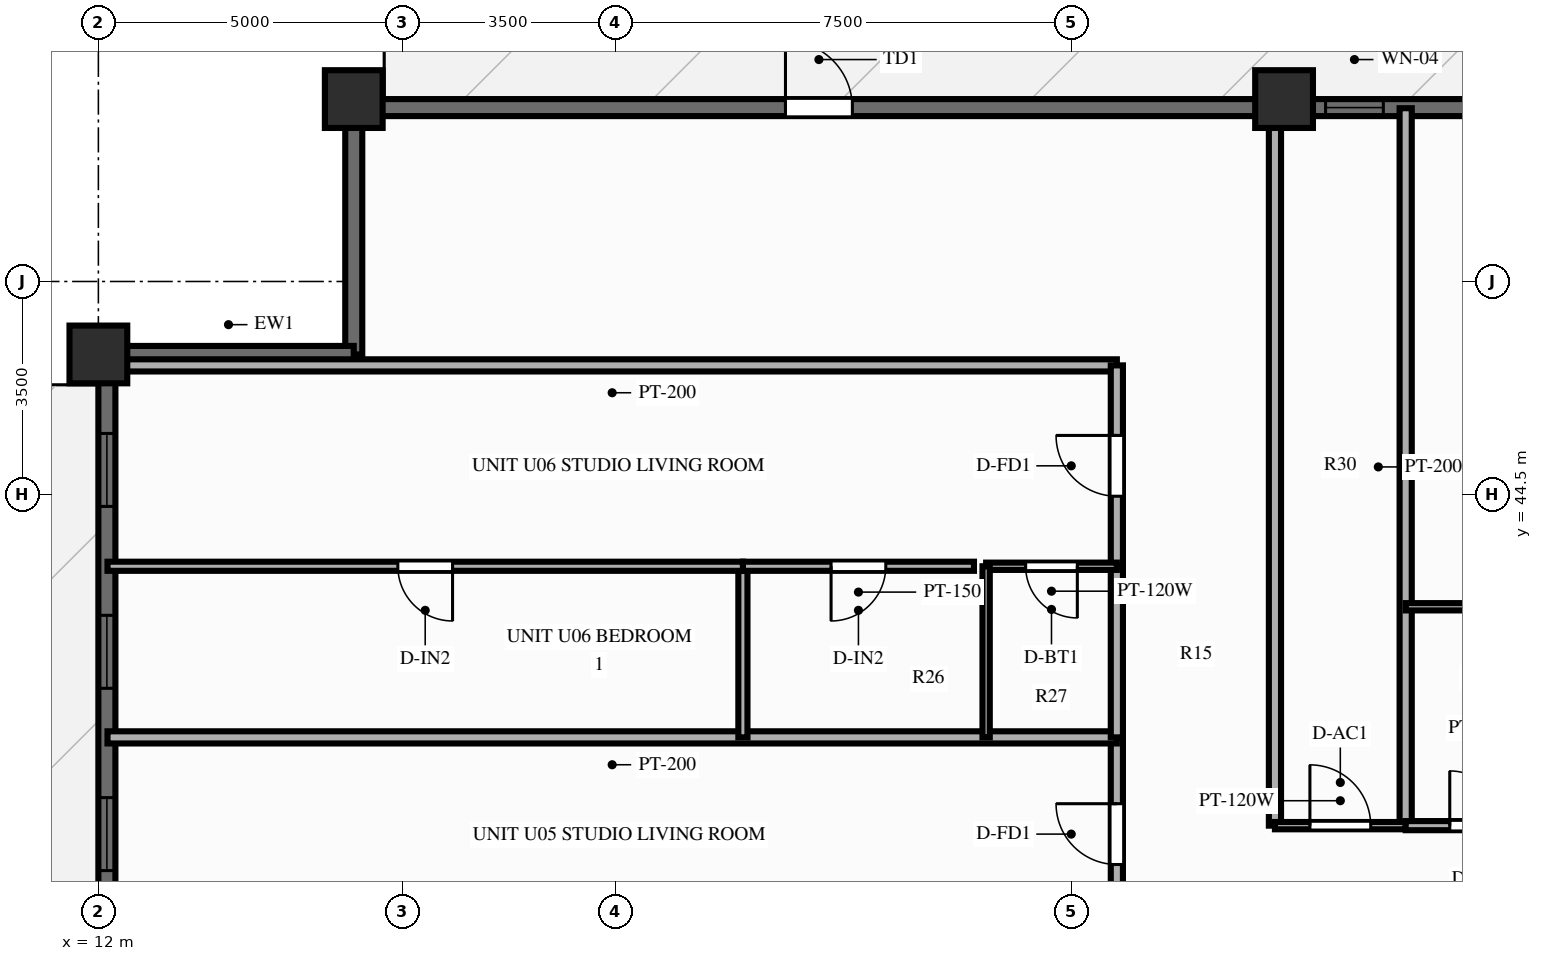
"""IFC4 building model, lengths in metres.
Left out: names, types, materials, properties, quantities, classifications, styles, units other than length and angle.
Written with IfcOpenShell. Run it as: python <this file> out.ifc"""

import sys

from ifc_helpers import new_model, si_unit, direction, frame, frame_2d, origin, origin_2d, place, context, subcontext, project, spatial, rectangle, extrude, source, transform, mapped, element, fill, save


model = new_model("IFC4")
c1 = context("Model", 3, precision=1e-05, world=origin(), true_north=direction((0.0, 1.0)))
c2 = subcontext(c1, "Body", "Model", "MODEL_VIEW")
j1 = project(units=[si_unit("LENGTHUNIT", "METRE"), si_unit("PLANEANGLEUNIT", "RADIAN")], contexts=[c1])
p1 = place(None, origin())
s1 = spatial("IfcSite", under=j1, at=p1, CompositionType="ELEMENT")
p2 = place(p1, origin())
s2 = spatial("IfcBuilding", under=s1, at=p2, CompositionType="ELEMENT")
p3 = place(p2, frame((0.0, 0.0, 92.85)))
s3 = spatial("IfcBuildingStorey", under=s2, at=p3, CompositionType="ELEMENT", Elevation=92.85)
m1 = source(origin(), c2, "Body", "SweptSolid", [
    extrude(rectangle(XDim=0.95, YDim=0.95, at=origin_2d()), origin(), (0.0, 0.0, 1.0), 3.0),
])
for number, where, z_axis, x_axis in (
    (1, (31.5, 51.0, 0.0), (0.0, 0.0, 1.0), (1.0, 0.0, 0.0)),
    (2, (16.2, 51.0, 0.0), (0.0, 0.0, 1.0), (1.0, 0.0, 0.0)),
    (3, (12.0, 46.8, 0.0), (0.0, 0.0, 1.0), (1.0, 0.0, 0.0)),
):
    element("IfcColumn", number, at=place(p3, frame(where, z_axis=z_axis, x_axis=x_axis)), inside=s3, PredefinedType="COLUMN", context=c2, shape_type="MappedRepresentation", body=[
        mapped(m1, transform((0.0, 0.0, 0.0), scale=1.0)),
    ])
p4 = place(p3, frame((16.2, 50.86, 0.0), z_axis=(0.0, 0.0, 1.0), x_axis=(1.0, 0.0, 0.0)))
e4 = element("IfcWall", 4, at=p4, inside=s3, PredefinedType="SOLIDWALL", context=c2, shape_type="SweptSolid", body=[
    extrude(rectangle(XDim=43.6, YDim=0.28, at=frame_2d((21.8, 0.0))), origin(), (0.0, 0.0, 1.0), 2.28),
])
p5 = place(p4, frame((7.1, 0.0, 0.0)))
e5 = element("IfcOpeningElement", 5, at=p5, cuts=e4, PredefinedType="OPENING", context=c2, shape_type="SweptSolid", body=[
    extrude(rectangle(XDim=1.1, YDim=2.15, at=frame_2d((0.55, 1.075))), frame((0.0, 0.152, 0.0), z_axis=(0.0, -1.0, 0.0), x_axis=(1.0, 0.0, 0.0)), (0.0, 0.0, 1.0), 0.304),
])
p6 = place(p4, frame((15.982, 0.0, 0.25)))
e6 = element("IfcOpeningElement", 6, at=p6, cuts=e4, PredefinedType="OPENING", context=c2, shape_type="SweptSolid", body=[
    extrude(rectangle(XDim=0.95, YDim=1.5, at=frame_2d((0.475, 0.75))), frame((0.0, 0.152, 0.0), z_axis=(0.0, -1.0, 0.0), x_axis=(1.0, 0.0, 0.0)), (0.0, 0.0, 1.0), 0.304),
])
p7 = place(p4, frame((19.15, 0.0, 0.25)))
e7 = element("IfcOpeningElement", 7, at=p7, cuts=e4, PredefinedType="OPENING", context=c2, shape_type="SweptSolid", body=[
    extrude(rectangle(XDim=1.2, YDim=1.5, at=frame_2d((0.6, 0.75))), frame((0.0, 0.152, 0.0), z_axis=(0.0, -1.0, 0.0), x_axis=(1.0, 0.0, 0.0)), (0.0, 0.0, 1.0), 0.304),
])
p8 = place(p4, frame((24.492, 0.0, 0.25)))
e8 = element("IfcOpeningElement", 8, at=p8, cuts=e4, PredefinedType="OPENING", context=c2, shape_type="SweptSolid", body=[
    extrude(rectangle(XDim=1.2, YDim=1.5, at=frame_2d((0.6, 0.75))), frame((0.0, 0.152, 0.0), z_axis=(0.0, -1.0, 0.0), x_axis=(1.0, 0.0, 0.0)), (0.0, 0.0, 1.0), 0.304),
])
p9 = place(p4, frame((35.35, 0.0, 0.25)))
e9 = element("IfcOpeningElement", 9, at=p9, cuts=e4, PredefinedType="OPENING", context=c2, shape_type="SweptSolid", body=[
    extrude(rectangle(XDim=1.2, YDim=1.5, at=frame_2d((0.6, 0.75))), frame((0.0, 0.152, 0.0), z_axis=(0.0, -1.0, 0.0), x_axis=(1.0, 0.0, 0.0)), (0.0, 0.0, 1.0), 0.304),
])
p10 = place(p3, frame((12.14, 7.2, 0.0), z_axis=(0.0, 0.0, 1.0), x_axis=(0.0, 1.0, 0.0)))
e10 = element("IfcWall", 10, at=p10, inside=s3, PredefinedType="SOLIDWALL", context=c2, shape_type="SweptSolid", body=[
    extrude(rectangle(XDim=39.6, YDim=0.28, at=frame_2d((19.8, 0.0))), origin(), (0.0, 0.0, 1.0), 2.28),
])
p11 = place(p10, frame((1.374, 0.0, 0.25)))
e11 = element("IfcOpeningElement", 11, at=p11, cuts=e10, PredefinedType="OPENING", context=c2, shape_type="SweptSolid", body=[
    extrude(rectangle(XDim=1.2, YDim=1.5, at=frame_2d((0.6, 0.75))), frame((0.0, 0.152, 0.0), z_axis=(0.0, -1.0, 0.0), x_axis=(1.0, 0.0, 0.0)), (0.0, 0.0, 1.0), 0.304),
])
p12 = place(p10, frame((4.458, 0.0, 0.25)))
e12 = element("IfcOpeningElement", 12, at=p12, cuts=e10, PredefinedType="OPENING", context=c2, shape_type="SweptSolid", body=[
    extrude(rectangle(XDim=1.2, YDim=1.5, at=frame_2d((0.6, 0.75))), frame((0.0, 0.152, 0.0), z_axis=(0.0, -1.0, 0.0), x_axis=(1.0, 0.0, 0.0)), (0.0, 0.0, 1.0), 0.304),
])
p13 = place(p10, frame((7.382, 0.0, 0.25)))
e13 = element("IfcOpeningElement", 13, at=p13, cuts=e10, PredefinedType="OPENING", context=c2, shape_type="SweptSolid", body=[
    extrude(rectangle(XDim=1.2, YDim=1.5, at=frame_2d((0.6, 0.75))), frame((0.0, 0.152, 0.0), z_axis=(0.0, -1.0, 0.0), x_axis=(1.0, 0.0, 0.0)), (0.0, 0.0, 1.0), 0.304),
])
p14 = place(p10, frame((11.508, 0.0, 0.25)))
e14 = element("IfcOpeningElement", 14, at=p14, cuts=e10, PredefinedType="OPENING", context=c2, shape_type="SweptSolid", body=[
    extrude(rectangle(XDim=0.7, YDim=1.5, at=frame_2d((0.35, 0.75))), frame((0.0, 0.152, 0.0), z_axis=(0.0, -1.0, 0.0), x_axis=(1.0, 0.0, 0.0)), (0.0, 0.0, 1.0), 0.304),
])
p15 = place(p10, frame((13.409, 0.0, 0.25)))
e15 = element("IfcOpeningElement", 15, at=p15, cuts=e10, PredefinedType="OPENING", context=c2, shape_type="SweptSolid", body=[
    extrude(rectangle(XDim=1.2, YDim=1.5, at=frame_2d((0.6, 0.75))), frame((0.0, 0.152, 0.0), z_axis=(0.0, -1.0, 0.0), x_axis=(1.0, 0.0, 0.0)), (0.0, 0.0, 1.0), 0.304),
])
p16 = place(p10, frame((16.468, 0.0, 0.25)))
e16 = element("IfcOpeningElement", 16, at=p16, cuts=e10, PredefinedType="OPENING", context=c2, shape_type="SweptSolid", body=[
    extrude(rectangle(XDim=1.2, YDim=1.5, at=frame_2d((0.6, 0.75))), frame((0.0, 0.152, 0.0), z_axis=(0.0, -1.0, 0.0), x_axis=(1.0, 0.0, 0.0)), (0.0, 0.0, 1.0), 0.304),
])
p17 = place(p10, frame((19.2, 0.0, 0.25)))
e17 = element("IfcOpeningElement", 17, at=p17, cuts=e10, PredefinedType="OPENING", context=c2, shape_type="SweptSolid", body=[
    extrude(rectangle(XDim=1.2, YDim=1.5, at=frame_2d((0.6, 0.75))), frame((0.0, 0.152, 0.0), z_axis=(0.0, -1.0, 0.0), x_axis=(1.0, 0.0, 0.0)), (0.0, 0.0, 1.0), 0.304),
])
p18 = place(p10, frame((21.807, 0.0, 0.0)))
e18 = element("IfcOpeningElement", 18, at=p18, cuts=e10, PredefinedType="OPENING", context=c2, shape_type="SweptSolid", body=[
    extrude(rectangle(XDim=1.6, YDim=2.15, at=frame_2d((0.8, 1.075))), frame((0.0, 0.152, 0.0), z_axis=(0.0, -1.0, 0.0), x_axis=(1.0, 0.0, 0.0)), (0.0, 0.0, 1.0), 0.304),
])
p19 = place(p10, frame((25.159, 0.0, 0.25)))
e19 = element("IfcOpeningElement", 19, at=p19, cuts=e10, PredefinedType="OPENING", context=c2, shape_type="SweptSolid", body=[
    extrude(rectangle(XDim=1.2, YDim=1.5, at=frame_2d((0.6, 0.75))), frame((0.0, 0.152, 0.0), z_axis=(0.0, -1.0, 0.0), x_axis=(1.0, 0.0, 0.0)), (0.0, 0.0, 1.0), 0.304),
])
p20 = place(p10, frame((27.484, 0.0, 0.25)))
e20 = element("IfcOpeningElement", 20, at=p20, cuts=e10, PredefinedType="OPENING", context=c2, shape_type="SweptSolid", body=[
    extrude(rectangle(XDim=0.7, YDim=1.5, at=frame_2d((0.35, 0.75))), frame((0.0, 0.152, 0.0), z_axis=(0.0, -1.0, 0.0), x_axis=(1.0, 0.0, 0.0)), (0.0, 0.0, 1.0), 0.304),
])
p21 = place(p10, frame((31.111, 0.0, 0.25)))
e21 = element("IfcOpeningElement", 21, at=p21, cuts=e10, PredefinedType="OPENING", context=c2, shape_type="SweptSolid", body=[
    extrude(rectangle(XDim=1.2, YDim=1.5, at=frame_2d((0.6, 0.75))), frame((0.0, 0.152, 0.0), z_axis=(0.0, -1.0, 0.0), x_axis=(1.0, 0.0, 0.0)), (0.0, 0.0, 1.0), 0.304),
])
p22 = place(p10, frame((34.109, 0.0, 0.25)))
e22 = element("IfcOpeningElement", 22, at=p22, cuts=e10, PredefinedType="OPENING", context=c2, shape_type="SweptSolid", body=[
    extrude(rectangle(XDim=1.2, YDim=1.5, at=frame_2d((0.6, 0.75))), frame((0.0, 0.152, 0.0), z_axis=(0.0, -1.0, 0.0), x_axis=(1.0, 0.0, 0.0)), (0.0, 0.0, 1.0), 0.304),
])
p23 = place(p10, frame((37.101, 0.0, 0.25)))
e23 = element("IfcOpeningElement", 23, at=p23, cuts=e10, PredefinedType="OPENING", context=c2, shape_type="SweptSolid", body=[
    extrude(rectangle(XDim=1.2, YDim=1.5, at=frame_2d((0.6, 0.75))), frame((0.0, 0.152, 0.0), z_axis=(0.0, -1.0, 0.0), x_axis=(1.0, 0.0, 0.0)), (0.0, 0.0, 1.0), 0.304),
])
for number, where, z_axis, x_axis in (
    (24, (16.2, 46.8, 0.0), (0.0, 0.0, 1.0), (0.0, 1.0, 0.0)),
    (25, (12.08, 46.8, 0.0), (0.0, 0.0, 1.0), (1.0, 0.0, 0.0)),
):
    element("IfcWall", number, at=place(p3, frame(where, z_axis=z_axis, x_axis=x_axis)), inside=s3, PredefinedType="SOLIDWALL", context=c2, shape_type="SweptSolid", body=[
        extrude(rectangle(XDim=4.12, YDim=0.28, at=frame_2d((2.06, 0.0))), origin(), (0.0, 0.0, 1.0), 2.28),
    ])
p24 = place(p3, frame((31.35, 39.05, 0.0), z_axis=(0.0, 0.0, 1.0), x_axis=(0.0, 1.0, 0.0)))
e26 = element("IfcWall", 26, at=p24, inside=s3, PredefinedType="PARTITIONING", context=c2, shape_type="SweptSolid", body=[
    extrude(rectangle(XDim=11.8, YDim=0.2, at=frame_2d((5.9, 0.0))), origin(), (0.0, 0.0, 1.0), 2.34),
])
p25 = place(p3, frame((33.5, 39.05, 0.0), z_axis=(0.0, 0.0, 1.0), x_axis=(0.0, 1.0, 0.0)))
e27 = element("IfcWall", 27, at=p25, inside=s3, PredefinedType="PARTITIONING", context=c2, shape_type="SweptSolid", body=[
    extrude(rectangle(XDim=11.8, YDim=0.2, at=frame_2d((5.9, 0.0))), origin(), (0.0, 0.0, 1.0), 2.79),
])
p26 = place(p3, frame((31.35, 39.05, 0.0), z_axis=(0.0, 0.0, 1.0), x_axis=(1.0, 0.0, 0.0)))
e28 = element("IfcWall", 28, at=p26, inside=s3, PredefinedType="PARTITIONING", context=c2, shape_type="SweptSolid", body=[
    extrude(rectangle(XDim=2.15, YDim=0.12, at=frame_2d((1.075, 0.0))), origin(), (0.0, 0.0, 1.0), 2.79),
])
p27 = place(p26, frame((0.575, 0.0, 0.0)))
e29 = element("IfcOpeningElement", 29, at=p27, cuts=e28, PredefinedType="OPENING", context=c2, shape_type="SweptSolid", body=[
    extrude(rectangle(XDim=1.0, YDim=2.1, at=frame_2d((0.5, 1.05))), frame((0.0, 0.072, 0.0), z_axis=(0.0, -1.0, 0.0), x_axis=(1.0, 0.0, 0.0)), (0.0, 0.0, 1.0), 0.144),
])
p28 = place(p3, frame((33.5, 42.65, 0.0), z_axis=(0.0, 0.0, 1.0), x_axis=(1.0, 0.0, 0.0)))
e30 = element("IfcWall", 30, at=p28, inside=s3, PredefinedType="PARTITIONING", context=c2, shape_type="SweptSolid", body=[
    extrude(rectangle(XDim=4.9, YDim=0.12, at=frame_2d((2.45, 0.0))), origin(), (0.0, 0.0, 1.0), 2.79),
])
p29 = place(p3, frame((33.5, 39.05, 0.0), z_axis=(0.0, 0.0, 1.0), x_axis=(1.0, 0.0, 0.0)))
e31 = element("IfcWall", 31, at=p29, inside=s3, PredefinedType="PARTITIONING", context=c2, shape_type="SweptSolid", body=[
    extrude(rectangle(XDim=2.35, YDim=0.15, at=frame_2d((1.175, 0.0))), origin(), (0.0, 0.0, 1.0), 2.79),
])
p30 = place(p29, frame((0.725, 0.0, 0.0)))
e32 = element("IfcOpeningElement", 32, at=p30, cuts=e31, PredefinedType="OPENING", context=c2, shape_type="SweptSolid", body=[
    extrude(rectangle(XDim=0.9, YDim=2.1, at=frame_2d((0.45, 1.05))), frame((0.0, 0.087, 0.0), z_axis=(0.0, -1.0, 0.0), x_axis=(1.0, 0.0, 0.0)), (0.0, 0.0, 1.0), 0.174),
])
p31 = place(p3, frame((28.75, 46.62, 0.0), z_axis=(0.0, 0.0, 1.0), x_axis=(-1.0, 0.0, 0.0)))
e33 = element("IfcWall", 33, at=p31, inside=s3, PredefinedType="PARTITIONING", context=c2, shape_type="SweptSolid", body=[
    extrude(rectangle(XDim=16.6, YDim=0.2, at=frame_2d((8.3, 0.0))), origin(), (0.0, 0.0, 1.0), 2.79),
])
p32 = place(p3, frame((28.75, 37.32, 0.0), z_axis=(0.0, 0.0, 1.0), x_axis=(0.0, 1.0, 0.0)))
e34 = element("IfcWall", 34, at=p32, inside=s3, PredefinedType="PARTITIONING", context=c2, shape_type="SweptSolid", body=[
    extrude(rectangle(XDim=3.182, YDim=0.2, at=frame_2d((1.591, 0.0))), origin(), (0.0, 0.0, 1.0), 2.79),
])
p33 = place(p32, frame((1.091, 0.0, 0.0)))
e35 = element("IfcOpeningElement", 35, at=p33, cuts=e34, PredefinedType="OPENING", context=c2, shape_type="SweptSolid", body=[
    extrude(rectangle(XDim=1.0, YDim=2.15, at=frame_2d((0.5, 1.075))), frame((0.0, 0.112, 0.0), z_axis=(0.0, -1.0, 0.0), x_axis=(1.0, 0.0, 0.0)), (0.0, 0.0, 1.0), 0.224),
])
p34 = place(p3, frame((28.75, 40.502, 0.0), z_axis=(0.0, 0.0, 1.0), x_axis=(-1.0, 0.0, 0.0)))
e36 = element("IfcWall", 36, at=p34, inside=s3, PredefinedType="PARTITIONING", context=c2, shape_type="SweptSolid", body=[
    extrude(rectangle(XDim=16.6, YDim=0.2, at=frame_2d((8.3, 0.0))), origin(), (0.0, 0.0, 1.0), 2.79),
])
p35 = place(p3, frame((28.75, 40.502, 0.0), z_axis=(0.0, 0.0, 1.0), x_axis=(0.0, 1.0, 0.0)))
e37 = element("IfcWall", 37, at=p35, inside=s3, PredefinedType="PARTITIONING", context=c2, shape_type="SweptSolid", body=[
    extrude(rectangle(XDim=2.814, YDim=0.2, at=frame_2d((1.407, 0.0))), origin(), (0.0, 0.0, 1.0), 2.79),
])
p36 = place(p3, frame((28.75, 43.316, 0.0), z_axis=(0.0, 0.0, 1.0), x_axis=(0.0, 1.0, 0.0)))
e38 = element("IfcWall", 38, at=p36, inside=s3, PredefinedType="PARTITIONING", context=c2, shape_type="SweptSolid", body=[
    extrude(rectangle(XDim=3.304, YDim=0.2, at=frame_2d((1.652, 0.0))), origin(), (0.0, 0.0, 1.0), 2.79),
])
p37 = place(p36, frame((1.152, 0.0, 0.0)))
e39 = element("IfcOpeningElement", 39, at=p37, cuts=e38, PredefinedType="OPENING", context=c2, shape_type="SweptSolid", body=[
    extrude(rectangle(XDim=1.0, YDim=2.15, at=frame_2d((0.5, 1.075))), frame((0.0, 0.112, 0.0), z_axis=(0.0, -1.0, 0.0), x_axis=(1.0, 0.0, 0.0)), (0.0, 0.0, 1.0), 0.224),
])
p38 = place(p3, frame((28.75, 43.316, 0.0), z_axis=(0.0, 0.0, 1.0), x_axis=(-1.0, 0.0, 0.0)))
e40 = element("IfcWall", 40, at=p38, inside=s3, PredefinedType="PARTITIONING", context=c2, shape_type="SweptSolid", body=[
    extrude(rectangle(XDim=2.15, YDim=0.12, at=frame_2d((1.075, 0.0))), origin(), (0.0, 0.0, 1.0), 2.79),
])
p39 = place(p38, frame((0.65, 0.0, 0.0)))
e41 = element("IfcOpeningElement", 41, at=p39, cuts=e40, PredefinedType="OPENING", context=c2, shape_type="SweptSolid", body=[
    extrude(rectangle(XDim=0.85, YDim=2.05, at=frame_2d((0.425, 1.025))), frame((0.0, 0.072, 0.0), z_axis=(0.0, -1.0, 0.0), x_axis=(1.0, 0.0, 0.0)), (0.0, 0.0, 1.0), 0.144),
])
p40 = place(p3, frame((26.6, 40.502, 0.0), z_axis=(0.0, 0.0, 1.0), x_axis=(0.0, 1.0, 0.0)))
e42 = element("IfcWall", 42, at=p40, inside=s3, PredefinedType="PARTITIONING", context=c2, shape_type="SweptSolid", body=[
    extrude(rectangle(XDim=2.814, YDim=0.12, at=frame_2d((1.407, 0.0))), origin(), (0.0, 0.0, 1.0), 2.79),
])
p41 = place(p3, frame((22.6, 40.502, 0.0), z_axis=(0.0, 0.0, 1.0), x_axis=(0.0, 1.0, 0.0)))
e43 = element("IfcWall", 43, at=p41, inside=s3, PredefinedType="PARTITIONING", context=c2, shape_type="SweptSolid", body=[
    extrude(rectangle(XDim=2.814, YDim=0.15, at=frame_2d((1.407, 0.0))), origin(), (0.0, 0.0, 1.0), 2.79),
])
p42 = place(p3, frame((26.4, 43.316, 0.0), z_axis=(0.0, 0.0, 1.0), x_axis=(-1.0, 0.0, 0.0)))
e44 = element("IfcWall", 44, at=p42, inside=s3, PredefinedType="PARTITIONING", context=c2, shape_type="SweptSolid", body=[
    extrude(rectangle(XDim=3.8, YDim=0.15, at=frame_2d((1.9, 0.0))), origin(), (0.0, 0.0, 1.0), 2.79),
])
p43 = place(p42, frame((1.45, 0.0, 0.0)))
e45 = element("IfcOpeningElement", 45, at=p43, cuts=e44, PredefinedType="OPENING", context=c2, shape_type="SweptSolid", body=[
    extrude(rectangle(XDim=0.9, YDim=2.1, at=frame_2d((0.45, 1.05))), frame((0.0, 0.087, 0.0), z_axis=(0.0, -1.0, 0.0), x_axis=(1.0, 0.0, 0.0)), (0.0, 0.0, 1.0), 0.174),
])
p44 = place(p3, frame((22.6, 43.316, 0.0), z_axis=(0.0, 0.0, 1.0), x_axis=(-1.0, 0.0, 0.0)))
e46 = element("IfcWall", 46, at=p44, inside=s3, PredefinedType="PARTITIONING", context=c2, shape_type="SweptSolid", body=[
    extrude(rectangle(XDim=10.45, YDim=0.15, at=frame_2d((5.225, 0.0))), origin(), (0.0, 0.0, 1.0), 2.79),
])
p45 = place(p44, frame((4.775, 0.0, 0.0)))
e47 = element("IfcOpeningElement", 47, at=p45, cuts=e46, PredefinedType="OPENING", context=c2, shape_type="SweptSolid", body=[
    extrude(rectangle(XDim=0.9, YDim=2.1, at=frame_2d((0.45, 1.05))), frame((0.0, 0.087, 0.0), z_axis=(0.0, -1.0, 0.0), x_axis=(1.0, 0.0, 0.0)), (0.0, 0.0, 1.0), 0.174),
])
m2 = source(origin(), c2, "Body", "SweptSolid", [
    extrude(rectangle(XDim=1.1, YDim=2.15, at=frame_2d((0.55, 1.075))), frame((0.0, 0.025, 0.0), z_axis=(0.0, -1.0, 0.0), x_axis=(1.0, 0.0, 0.0)), (0.0, 0.0, 1.0), 0.05),
])
p46 = place(p5, origin())
e48 = element("IfcDoor", 48, at=p46, inside=s3, OperationType="SINGLE_SWING_LEFT", PredefinedType="DOOR", context=c2, shape_type="MappedRepresentation", body=[
    mapped(m2, transform((0.0, 0.0, 0.0), scale=1.0)),
])
fill(e5, e48)
m3 = source(origin(), c2, "Body", "SweptSolid", [
    extrude(rectangle(XDim=0.95, YDim=1.5, at=frame_2d((0.475, 0.75))), frame((0.0, 0.03, 0.0), z_axis=(0.0, -1.0, 0.0), x_axis=(1.0, 0.0, 0.0)), (0.0, 0.0, 1.0), 0.06),
])
p47 = place(p6, origin())
e49 = element("IfcWindow", 49, at=p47, inside=s3, PartitioningType="SINGLE_PANEL", PredefinedType="WINDOW", context=c2, shape_type="MappedRepresentation", body=[
    mapped(m3, transform((0.0, 0.0, 0.0), scale=1.0)),
])
fill(e6, e49)
m4 = source(origin(), c2, "Body", "SweptSolid", [
    extrude(rectangle(XDim=1.2, YDim=1.5, at=frame_2d((0.6, 0.75))), frame((0.0, 0.03, 0.0), z_axis=(0.0, -1.0, 0.0), x_axis=(1.0, 0.0, 0.0)), (0.0, 0.0, 1.0), 0.06),
])
p48 = place(p21, origin())
e50 = element("IfcWindow", 50, at=p48, inside=s3, PartitioningType="SINGLE_PANEL", PredefinedType="WINDOW", context=c2, shape_type="MappedRepresentation", body=[
    mapped(m4, transform((0.0, 0.0, 0.0), scale=1.0)),
])
fill(e21, e50)
p49 = place(p22, origin())
e51 = element("IfcWindow", 51, at=p49, inside=s3, PartitioningType="SINGLE_PANEL", PredefinedType="WINDOW", context=c2, shape_type="MappedRepresentation", body=[
    mapped(m4, transform((0.0, 0.0, 0.0), scale=1.0)),
])
fill(e22, e51)
p50 = place(p23, origin())
e52 = element("IfcWindow", 52, at=p50, inside=s3, PartitioningType="SINGLE_PANEL", PredefinedType="WINDOW", context=c2, shape_type="MappedRepresentation", body=[
    mapped(m4, transform((0.0, 0.0, 0.0), scale=1.0)),
])
fill(e23, e52)
m5 = source(origin(), c2, "Body", "SweptSolid", [
    extrude(rectangle(XDim=1.0, YDim=2.1, at=frame_2d((0.5, 1.05))), frame((0.0, 0.025, 0.0), z_axis=(0.0, -1.0, 0.0), x_axis=(1.0, 0.0, 0.0)), (0.0, 0.0, 1.0), 0.05),
])
p51 = place(p27, origin())
e53 = element("IfcDoor", 53, at=p51, inside=s3, OperationType="SINGLE_SWING_LEFT", PredefinedType="DOOR", context=c2, shape_type="MappedRepresentation", body=[
    mapped(m5, transform((0.0, 0.0, 0.0), scale=1.0)),
])
fill(e29, e53)
m6 = source(origin(), c2, "Body", "SweptSolid", [
    extrude(rectangle(XDim=0.9, YDim=2.1, at=frame_2d((0.45, 1.05))), frame((0.0, 0.025, 0.0), z_axis=(0.0, -1.0, 0.0), x_axis=(1.0, 0.0, 0.0)), (0.0, 0.0, 1.0), 0.05),
])
p52 = place(p30, origin())
e54 = element("IfcDoor", 54, at=p52, inside=s3, OperationType="SINGLE_SWING_LEFT", PredefinedType="DOOR", context=c2, shape_type="MappedRepresentation", body=[
    mapped(m6, transform((0.0, 0.0, 0.0), scale=1.0)),
])
fill(e32, e54)
m7 = source(origin(), c2, "Body", "SweptSolid", [
    extrude(rectangle(XDim=1.0, YDim=2.15, at=frame_2d((0.5, 1.075))), frame((0.0, 0.025, 0.0), z_axis=(0.0, -1.0, 0.0), x_axis=(1.0, 0.0, 0.0)), (0.0, 0.0, 1.0), 0.05),
])
p53 = place(p33, origin())
e55 = element("IfcDoor", 55, at=p53, inside=s3, OperationType="SINGLE_SWING_RIGHT", PredefinedType="DOOR", context=c2, shape_type="MappedRepresentation", body=[
    mapped(m7, transform((0.0, 0.0, 0.0), scale=1.0)),
])
fill(e35, e55)
p54 = place(p37, origin())
e56 = element("IfcDoor", 56, at=p54, inside=s3, OperationType="SINGLE_SWING_RIGHT", PredefinedType="DOOR", context=c2, shape_type="MappedRepresentation", body=[
    mapped(m7, transform((0.0, 0.0, 0.0), scale=1.0)),
])
fill(e39, e56)
m8 = source(origin(), c2, "Body", "SweptSolid", [
    extrude(rectangle(XDim=0.85, YDim=2.05, at=frame_2d((0.425, 1.025))), frame((0.0, 0.025, 0.0), z_axis=(0.0, -1.0, 0.0), x_axis=(1.0, 0.0, 0.0)), (0.0, 0.0, 1.0), 0.05),
])
p55 = place(p39, origin())
e57 = element("IfcDoor", 57, at=p55, inside=s3, OperationType="SINGLE_SWING_LEFT", PredefinedType="DOOR", context=c2, shape_type="MappedRepresentation", body=[
    mapped(m8, transform((0.0, 0.0, 0.0), scale=1.0)),
])
fill(e41, e57)
p56 = place(p43, origin())
e58 = element("IfcDoor", 58, at=p56, inside=s3, OperationType="SINGLE_SWING_RIGHT", PredefinedType="DOOR", context=c2, shape_type="MappedRepresentation", body=[
    mapped(m6, transform((0.0, 0.0, 0.0), scale=1.0)),
])
fill(e45, e58)
p57 = place(p45, origin())
e59 = element("IfcDoor", 59, at=p57, inside=s3, OperationType="SINGLE_SWING_LEFT", PredefinedType="DOOR", context=c2, shape_type="MappedRepresentation", body=[
    mapped(m6, transform((0.0, 0.0, 0.0), scale=1.0)),
])
fill(e47, e59)
save(model, sys.argv[1])
